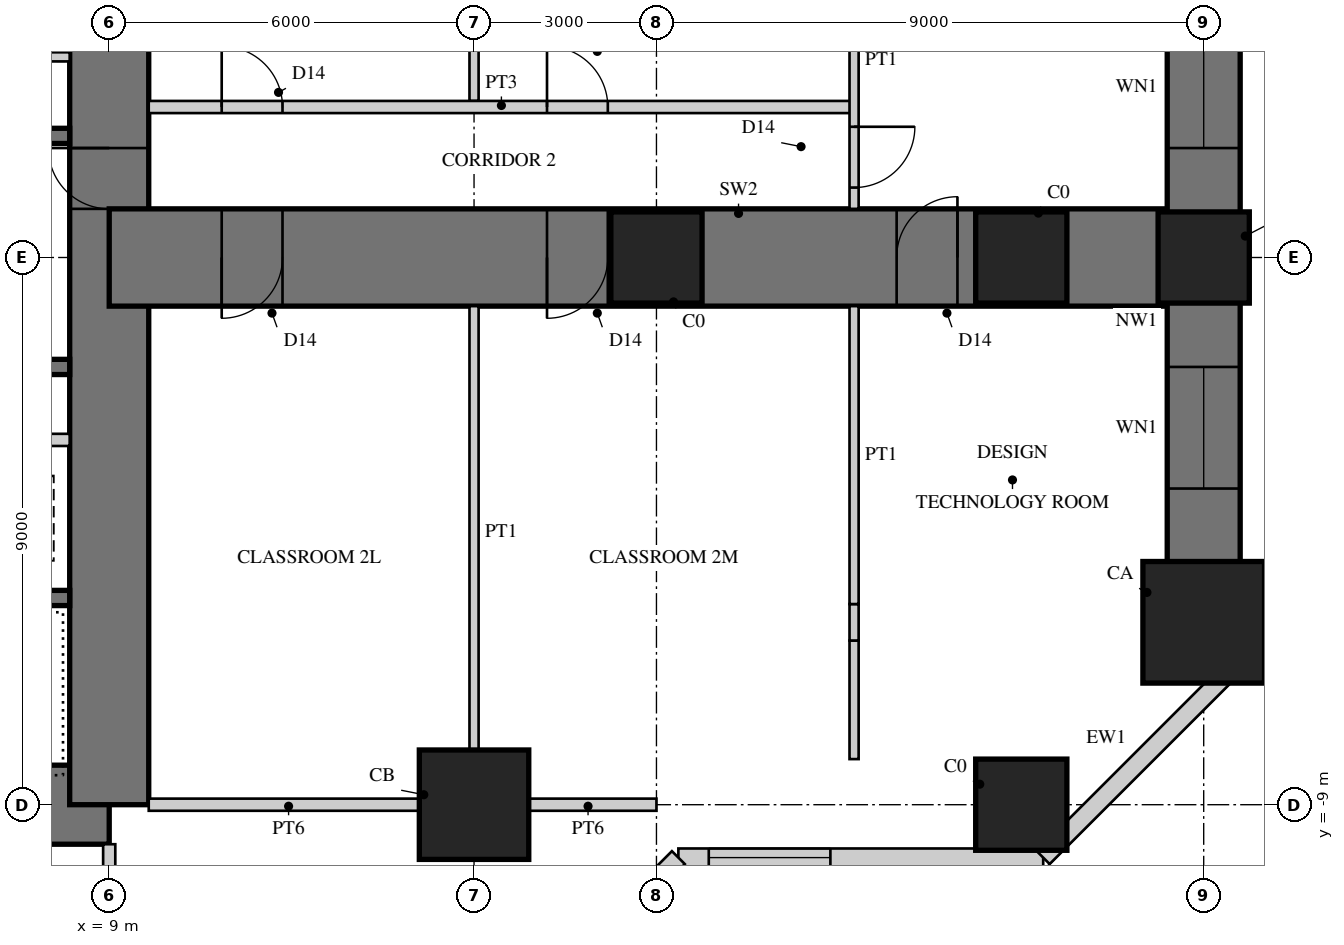
"""IFC4 building model, lengths in metres.
Left out: names, types, materials, properties, quantities, classifications, styles, units other than length and angle.
Written with IfcOpenShell. Run it as: python <this file> out.ifc"""

import sys

from ifc_helpers import new_model, si_unit, direction, frame, frame_2d, origin, origin_2d, place, context, subcontext, project, spatial, rectangle, hollow_rectangle, extrude, element, fill, save


model = new_model("IFC4")
c1 = context("Model", 3, precision=1e-05, world=origin(), true_north=direction((0.0, 1.0)))
c2 = subcontext(c1, "Body", "Model", "MODEL_VIEW")
j1 = project(units=[si_unit("LENGTHUNIT", "METRE"), si_unit("PLANEANGLEUNIT", "RADIAN")], contexts=[c1])
p1 = place(None, origin())
s1 = spatial("IfcSite", under=j1, at=p1, CompositionType="ELEMENT")
p2 = place(p1, origin())
s2 = spatial("IfcBuilding", under=s1, at=p2, CompositionType="ELEMENT")
p3 = place(p2, frame((0.0, 0.0, 9.5)))
s3 = spatial("IfcBuildingStorey", under=s2, at=p3, CompositionType="ELEMENT", Elevation=9.5)
p4 = place(p3, frame((-9.0, -9.0, 0.0), z_axis=(0.0, 0.0, 1.0), x_axis=(1.0, 0.0, 0.0)))
e1 = element("IfcWall", 1, at=p4, inside=s3, PredefinedType="SHEAR", context=c2, shape_type="SweptSolid", body=[
    extrude(rectangle(XDim=18.0, YDim=1.3, at=frame_2d((9.0, 0.0))), origin(), (0.0, 0.0, 1.0), 4.5),
])
p5 = place(p4, frame((9.8, 0.0, 0.0)))
e2 = element("IfcOpeningElement", 2, at=p5, cuts=e1, PredefinedType="OPENING", context=c2, shape_type="SweptSolid", body=[
    extrude(rectangle(XDim=1.0, YDim=2.4, at=frame_2d((0.5, 1.2))), frame((0.0, 0.66, 0.0), z_axis=(0.0, -1.0, 0.0), x_axis=(1.0, 0.0, 0.0)), (0.0, 0.0, 1.0), 1.32),
])
p6 = place(p3, frame((9.0, -9.0, 0.0), z_axis=(0.0, 0.0, 1.0), x_axis=(0.0, 1.0, 0.0)))
e3 = element("IfcWall", 3, at=p6, inside=s3, PredefinedType="SHEAR", context=c2, shape_type="SweptSolid", body=[
    extrude(rectangle(XDim=18.0, YDim=1.3, at=frame_2d((9.0, 0.0))), origin(), (0.0, 0.0, 1.0), 4.5),
])
p7 = place(p6, frame((9.8, 0.0, 0.0)))
e4 = element("IfcOpeningElement", 4, at=p7, cuts=e3, PredefinedType="OPENING", context=c2, shape_type="SweptSolid", body=[
    extrude(rectangle(XDim=1.0, YDim=2.4, at=frame_2d((0.5, 1.2))), frame((0.0, 0.66, 0.0), z_axis=(0.0, -1.0, 0.0), x_axis=(1.0, 0.0, 0.0)), (0.0, 0.0, 1.0), 1.32),
])
p8 = place(p3, frame((1.925, 2.0, 0.0), z_axis=(0.0, 0.0, 1.0), x_axis=(1.0, 0.0, 0.0)))
e5 = element("IfcWall", 5, at=p8, inside=s3, PredefinedType="SHEAR", context=c2, shape_type="SweptSolid", body=[
    extrude(rectangle(XDim=6.425, YDim=0.25, at=frame_2d((3.212, 0.0))), origin(), (0.0, 0.0, 1.0), 4.5),
])
p9 = place(p3, frame((1.925, 3.3, 0.0), z_axis=(0.0, 0.0, 1.0), x_axis=(1.0, 0.0, 0.0)))
e6 = element("IfcWall", 6, at=p9, inside=s3, PredefinedType="PARTITIONING", context=c2, shape_type="SweptSolid", body=[
    extrude(rectangle(XDim=6.425, YDim=0.15, at=frame_2d((3.212, 0.0))), origin(), (0.0, 0.0, 1.0), 4.5),
])
p10 = place(p9, frame((0.075, 0.0, 0.0)))
e7 = element("IfcOpeningElement", 7, at=p10, cuts=e6, PredefinedType="OPENING", context=c2, shape_type="SweptSolid", body=[
    extrude(rectangle(XDim=0.8, YDim=2.1, at=frame_2d((0.4, 1.05))), frame((0.0, 0.085, 0.0), z_axis=(0.0, -1.0, 0.0), x_axis=(1.0, 0.0, 0.0)), (0.0, 0.0, 1.0), 0.17),
])
p11 = place(p9, frame((3.675, 0.0, 0.0)))
e8 = element("IfcOpeningElement", 8, at=p11, cuts=e6, PredefinedType="OPENING", context=c2, shape_type="SweptSolid", body=[
    extrude(rectangle(XDim=0.8, YDim=2.1, at=frame_2d((0.4, 1.05))), frame((0.0, 0.085, 0.0), z_axis=(0.0, -1.0, 0.0), x_axis=(1.0, 0.0, 0.0)), (0.0, 0.0, 1.0), 0.17),
])
p12 = place(p3, frame((2.125, -1.8, 0.0), z_axis=(0.0, 0.0, 1.0), x_axis=(1.0, 0.0, 0.0)))
e9 = element("IfcWall", 9, at=p12, inside=s3, PredefinedType="SHEAR", context=c2, shape_type="SweptSolid", body=[
    extrude(rectangle(XDim=6.225, YDim=0.25, at=frame_2d((3.113, 0.0))), origin(), (0.0, 0.0, 1.0), 4.5),
])
p13 = place(p3, frame((2.125, -5.6, 0.0), z_axis=(0.0, 0.0, 1.0), x_axis=(1.0, 0.0, 0.0)))
e10 = element("IfcWall", 10, at=p13, inside=s3, PredefinedType="SHEAR", context=c2, shape_type="SweptSolid", body=[
    extrude(rectangle(XDim=6.225, YDim=0.25, at=frame_2d((3.113, 0.0))), origin(), (0.0, 0.0, 1.0), 4.5),
])
p14 = place(p13, frame((0.175, 0.0, 0.0)))
e11 = element("IfcOpeningElement", 11, at=p14, cuts=e10, PredefinedType="OPENING", context=c2, shape_type="SweptSolid", body=[
    extrude(rectangle(XDim=1.0, YDim=2.1, at=frame_2d((0.5, 1.05))), frame((0.0, 0.135, 0.0), z_axis=(0.0, -1.0, 0.0), x_axis=(1.0, 0.0, 0.0)), (0.0, 0.0, 1.0), 0.27),
])
p15 = place(p3, frame((5.725, -3.0, 0.0), z_axis=(0.0, 0.0, 1.0), x_axis=(1.0, 0.0, 0.0)))
e12 = element("IfcWall", 12, at=p15, inside=s3, PredefinedType="PARTITIONING", context=c2, shape_type="SweptSolid", body=[
    extrude(rectangle(XDim=2.625, YDim=0.2, at=frame_2d((1.312, 0.0))), origin(), (0.0, 0.0, 1.0), 4.5),
])
p16 = place(p3, frame((9.0, 0.0, 0.0), z_axis=(0.0, 0.0, 1.0), x_axis=(1.0, 0.0, 0.0)))
e13 = element("IfcWall", 13, at=p16, inside=s3, PredefinedType="SHEAR", context=c2, shape_type="SweptSolid", body=[
    extrude(rectangle(XDim=18.0, YDim=1.6, at=frame_2d((9.0, 0.0))), origin(), (0.0, 0.0, 1.0), 4.5),
])
p17 = place(p16, frame((1.85, 0.0, 0.0)))
e14 = element("IfcOpeningElement", 14, at=p17, cuts=e13, PredefinedType="OPENING", context=c2, shape_type="SweptSolid", body=[
    extrude(rectangle(XDim=1.0, YDim=2.2, at=frame_2d((0.5, 1.1))), frame((0.0, 0.81, 0.0), z_axis=(0.0, -1.0, 0.0), x_axis=(1.0, 0.0, 0.0)), (0.0, 0.0, 1.0), 1.62),
])
p18 = place(p16, frame((7.2, 0.0, 0.0)))
e15 = element("IfcOpeningElement", 15, at=p18, cuts=e13, PredefinedType="OPENING", context=c2, shape_type="SweptSolid", body=[
    extrude(rectangle(XDim=1.0, YDim=2.2, at=frame_2d((0.5, 1.1))), frame((0.0, 0.81, 0.0), z_axis=(0.0, -1.0, 0.0), x_axis=(1.0, 0.0, 0.0)), (0.0, 0.0, 1.0), 1.62),
])
p19 = place(p16, frame((12.95, 0.0, 0.0)))
e16 = element("IfcOpeningElement", 16, at=p19, cuts=e13, PredefinedType="OPENING", context=c2, shape_type="SweptSolid", body=[
    extrude(rectangle(XDim=1.0, YDim=2.2, at=frame_2d((0.5, 1.1))), frame((0.0, 0.81, 0.0), z_axis=(0.0, -1.0, 0.0), x_axis=(1.0, 0.0, 0.0)), (0.0, 0.0, 1.0), 1.62),
])
p20 = place(p3, frame((27.0, -6.0, 0.0), z_axis=(0.0, 0.0, 1.0), x_axis=(0.0, 1.0, 0.0)))
e17 = element("IfcWall", 17, at=p20, inside=s3, PredefinedType="SHEAR", context=c2, shape_type="SweptSolid", body=[
    extrude(rectangle(XDim=12.0, YDim=1.2, at=frame_2d((6.0, 0.0))), origin(), (0.0, 0.0, 1.0), 4.5),
])
p21 = place(p20, frame((2.2, 0.0, 0.9)))
e18 = element("IfcOpeningElement", 18, at=p21, cuts=e17, PredefinedType="OPENING", context=c2, shape_type="SweptSolid", body=[
    extrude(rectangle(XDim=2.0, YDim=1.8, at=frame_2d((1.0, 0.9))), frame((0.0, 0.61, 0.0), z_axis=(0.0, -1.0, 0.0), x_axis=(1.0, 0.0, 0.0)), (0.0, 0.0, 1.0), 1.22),
])
p22 = place(p20, frame((7.8, 0.0, 0.9)))
e19 = element("IfcOpeningElement", 19, at=p22, cuts=e17, PredefinedType="OPENING", context=c2, shape_type="SweptSolid", body=[
    extrude(rectangle(XDim=2.0, YDim=1.8, at=frame_2d((1.0, 0.9))), frame((0.0, 0.61, 0.0), z_axis=(0.0, -1.0, 0.0), x_axis=(1.0, 0.0, 0.0)), (0.0, 0.0, 1.0), 1.22),
])
p23 = place(p3, frame((15.0, -9.0, 0.0), z_axis=(0.0, 0.0, 1.0), x_axis=(1.0, 0.0, 0.0)))
e20 = element("IfcColumn", 20, at=p23, inside=s3, PredefinedType="COLUMN", context=c2, shape_type="SweptSolid", body=[
    extrude(rectangle(XDim=1.8, YDim=1.8, at=origin_2d()), origin(), (0.0, 0.0, 1.0), 4.5),
])
p24 = place(p3, frame((24.0, -9.0, 0.0), z_axis=(0.0, 0.0, 1.0), x_axis=(1.0, 0.0, 0.0)))
e21 = element("IfcColumn", 21, at=p24, inside=s3, PredefinedType="COLUMN", context=c2, shape_type="SweptSolid", body=[
    extrude(rectangle(XDim=1.5, YDim=1.5, at=origin_2d()), origin(), (0.0, 0.0, 1.0), 4.5),
])
p25 = place(p3, frame((27.0, -6.0, 0.0), z_axis=(0.0, 0.0, 1.0), x_axis=(1.0, 0.0, 0.0)))
e22 = element("IfcColumn", 22, at=p25, inside=s3, PredefinedType="COLUMN", context=c2, shape_type="SweptSolid", body=[
    extrude(rectangle(XDim=2.0, YDim=2.0, at=origin_2d()), origin(), (0.0, 0.0, 1.0), 4.5),
])
for number, where, z_axis, x_axis in (
    (23, (27.0, 0.0, 0.0), (0.0, 0.0, 1.0), (1.0, 0.0, 0.0)),
    (24, (18.0, 0.0, 0.0), (0.0, 0.0, 1.0), (1.0, 0.0, 0.0)),
    (25, (24.0, 0.0, 0.0), (0.0, 0.0, 1.0), (1.0, 0.0, 0.0)),
):
    element("IfcColumn", number, at=place(p3, frame(where, z_axis=z_axis, x_axis=x_axis)), inside=s3, PredefinedType="COLUMN", context=c2, shape_type="SweptSolid", body=[
        extrude(rectangle(XDim=1.5, YDim=1.5, at=origin_2d()), origin(), (0.0, 0.0, 1.0), 4.5),
    ])
p26 = place(p3, frame((18.36, -9.87, 0.0), z_axis=(0.0, 0.0, 1.0), x_axis=(1.0, 0.0, 0.0)))
e26 = element("IfcWall", 26, at=p26, inside=s3, PredefinedType="SOLIDWALL", context=c2, shape_type="SweptSolid", body=[
    extrude(rectangle(XDim=6.0, YDim=0.3, at=frame_2d((3.0, 0.0))), origin(), (0.0, 0.0, 1.0), 4.3),
])
p27 = place(p26, frame((0.5, 0.0, 0.9)))
e27 = element("IfcOpeningElement", 27, at=p27, cuts=e26, PredefinedType="OPENING", context=c2, shape_type="SweptSolid", body=[
    extrude(rectangle(XDim=2.0, YDim=1.8, at=frame_2d((1.0, 0.9))), frame((0.0, 0.16, 0.0), z_axis=(0.0, -1.0, 0.0), x_axis=(1.0, 0.0, 0.0)), (0.0, 0.0, 1.0), 0.32),
])
p28 = place(p3, frame((24.36, -9.87, 0.0), z_axis=(0.0, 0.0, 1.0), x_axis=(0.707106781187, 0.707106781187, 0.0)))
e28 = element("IfcWall", 28, at=p28, inside=s3, PredefinedType="SOLIDWALL", context=c2, shape_type="SweptSolid", body=[
    extrude(rectangle(XDim=4.582, YDim=0.3, at=frame_2d((2.291, 0.0))), origin(), (0.0, 0.0, 1.0), 4.3),
])
p29 = place(p3, frame((9.87, -18.36, 0.0), z_axis=(0.0, 0.0, 1.0), x_axis=(0.707106781187, 0.707106781187, 0.0)))
e29 = element("IfcWall", 29, at=p29, inside=s3, PredefinedType="SOLIDWALL", context=c2, shape_type="SweptSolid", body=[
    extrude(rectangle(XDim=12.007, YDim=0.3, at=frame_2d((6.003, 0.0))), origin(), (0.0, 0.0, 1.0), 4.3),
])
p30 = place(p29, frame((0.501, 0.0, 0.9)))
e30 = element("IfcOpeningElement", 30, at=p30, cuts=e29, PredefinedType="OPENING", context=c2, shape_type="SweptSolid", body=[
    extrude(rectangle(XDim=2.0, YDim=1.8, at=frame_2d((1.0, 0.9))), frame((0.0, 0.16, 0.0), z_axis=(0.0, -1.0, 0.0), x_axis=(1.0, 0.0, 0.0)), (0.0, 0.0, 1.0), 0.32),
])
p31 = place(p29, frame((9.506, 0.0, 0.9)))
e31 = element("IfcOpeningElement", 31, at=p31, cuts=e29, PredefinedType="OPENING", context=c2, shape_type="SweptSolid", body=[
    extrude(rectangle(XDim=2.0, YDim=1.8, at=frame_2d((1.0, 0.9))), frame((0.0, 0.16, 0.0), z_axis=(0.0, -1.0, 0.0), x_axis=(1.0, 0.0, 0.0)), (0.0, 0.0, 1.0), 0.32),
])
p32 = place(p3, frame((15.0, 2.575, 0.0), z_axis=(0.0, 0.0, 1.0), x_axis=(0.0, 1.0, 0.0)))
e32 = element("IfcWall", 32, at=p32, inside=s3, PredefinedType="PARTITIONING", context=c2, shape_type="SweptSolid", body=[
    extrude(rectangle(XDim=5.675, YDim=0.15, at=frame_2d((2.837, 0.0))), origin(), (0.0, 0.0, 1.0), 3.35),
])
p33 = place(p3, frame((15.0, -8.25, 0.0), z_axis=(0.0, 0.0, 1.0), x_axis=(0.0, 1.0, 0.0)))
e33 = element("IfcWall", 33, at=p33, inside=s3, PredefinedType="PARTITIONING", context=c2, shape_type="SweptSolid", body=[
    extrude(rectangle(XDim=7.45, YDim=0.15, at=frame_2d((3.725, 0.0))), origin(), (0.0, 0.0, 1.0), 3.35),
])
p34 = place(p3, frame((9.65, 2.475, 0.0), z_axis=(0.0, 0.0, 1.0), x_axis=(1.0, 0.0, 0.0)))
e34 = element("IfcWall", 34, at=p34, inside=s3, PredefinedType="SOLIDWALL", context=c2, shape_type="SweptSolid", body=[
    extrude(rectangle(XDim=11.6, YDim=0.2, at=frame_2d((5.8, 0.0))), origin(), (0.0, 0.0, 1.0), 4.3),
])
p35 = place(p34, frame((1.2, 0.0, 0.0)))
e35 = element("IfcOpeningElement", 35, at=p35, cuts=e34, PredefinedType="OPENING", context=c2, shape_type="SweptSolid", body=[
    extrude(rectangle(XDim=1.0, YDim=2.2, at=frame_2d((0.5, 1.1))), frame((0.0, 0.11, 0.0), z_axis=(0.0, -1.0, 0.0), x_axis=(1.0, 0.0, 0.0)), (0.0, 0.0, 1.0), 0.22),
])
p36 = place(p34, frame((6.55, 0.0, 0.0)))
e36 = element("IfcOpeningElement", 36, at=p36, cuts=e34, PredefinedType="OPENING", context=c2, shape_type="SweptSolid", body=[
    extrude(rectangle(XDim=1.0, YDim=2.2, at=frame_2d((0.5, 1.1))), frame((0.0, 0.11, 0.0), z_axis=(0.0, -1.0, 0.0), x_axis=(1.0, 0.0, 0.0)), (0.0, 0.0, 1.0), 0.22),
])
p37 = place(p3, frame((21.25, -8.25, 0.0), z_axis=(0.0, 0.0, 1.0), x_axis=(0.0, 1.0, 0.0)))
e37 = element("IfcWall", 37, at=p37, inside=s3, PredefinedType="PARTITIONING", context=c2, shape_type="SweptSolid", body=[
    extrude(rectangle(XDim=1.95, YDim=0.15, at=frame_2d((0.975, 0.0))), origin(), (0.0, 0.0, 1.0), 3.35),
])
p38 = place(p3, frame((21.25, -6.3, 0.0), z_axis=(0.0, 0.0, 1.0), x_axis=(0.0, 1.0, 0.0)))
e38 = element("IfcWall", 38, at=p38, inside=s3, PredefinedType="PARTITIONING", context=c2, shape_type="SweptSolid", body=[
    extrude(rectangle(XDim=0.6, YDim=0.15, at=frame_2d((0.3, 0.0))), origin(), (0.0, 0.0, 1.0), 4.3),
])
p39 = place(p3, frame((21.25, -5.7, 0.0), z_axis=(0.0, 0.0, 1.0), x_axis=(0.0, 1.0, 0.0)))
e39 = element("IfcWall", 39, at=p39, inside=s3, PredefinedType="PARTITIONING", context=c2, shape_type="SweptSolid", body=[
    extrude(rectangle(XDim=4.9, YDim=0.15, at=frame_2d((2.45, 0.0))), origin(), (0.0, 0.0, 1.0), 3.35),
])
p40 = place(p3, frame((21.25, 0.8, 0.0), z_axis=(0.0, 0.0, 1.0), x_axis=(0.0, 1.0, 0.0)))
e40 = element("IfcWall", 40, at=p40, inside=s3, PredefinedType="PARTITIONING", context=c2, shape_type="SweptSolid", body=[
    extrude(rectangle(XDim=4.9, YDim=0.15, at=frame_2d((2.45, 0.0))), origin(), (0.0, 0.0, 1.0), 3.35),
])
p41 = place(p40, frame((0.35, 0.0, 0.0)))
e41 = element("IfcOpeningElement", 41, at=p41, cuts=e40, PredefinedType="OPENING", context=c2, shape_type="SweptSolid", body=[
    extrude(rectangle(XDim=1.0, YDim=2.2, at=frame_2d((0.5, 1.1))), frame((0.0, 0.085, 0.0), z_axis=(0.0, -1.0, 0.0), x_axis=(1.0, 0.0, 0.0)), (0.0, 0.0, 1.0), 0.17),
])
p42 = place(p3, frame((9.0, -9.65, 0.0), z_axis=(0.0, 0.0, 1.0), x_axis=(0.0, -1.0, 0.0)))
e42 = element("IfcWall", 42, at=p42, inside=s3, PredefinedType="SOLIDWALL", context=c2, shape_type="SweptSolid", body=[
    extrude(rectangle(XDim=4.6, YDim=0.2, at=frame_2d((2.3, 0.0))), origin(), (0.0, 0.0, 1.0), 3.3),
])
p43 = place(p42, frame((1.2, 0.0, 0.0)))
e43 = element("IfcOpeningElement", 43, at=p43, cuts=e42, PredefinedType="OPENING", context=c2, shape_type="SweptSolid", body=[
    extrude(rectangle(XDim=1.0, YDim=2.2, at=frame_2d((0.5, 1.1))), frame((0.0, 0.11, 0.0), z_axis=(0.0, -1.0, 0.0), x_axis=(1.0, 0.0, 0.0)), (0.0, 0.0, 1.0), 0.22),
])
p44 = place(p3, frame((14.25, -9.0, 0.0), z_axis=(0.0, 0.0, 1.0), x_axis=(-1.0, 0.0, 0.0)))
e44 = element("IfcWall", 44, at=p44, inside=s3, PredefinedType="SOLIDWALL", context=c2, shape_type="SweptSolid", body=[
    extrude(rectangle(XDim=4.6, YDim=0.2, at=frame_2d((2.3, 0.0))), origin(), (0.0, 0.0, 1.0), 3.3),
])
p45 = place(p3, frame((18.0, -9.0, 0.0), z_axis=(0.0, 0.0, 1.0), x_axis=(-1.0, 0.0, 0.0)))
e45 = element("IfcWall", 45, at=p45, inside=s3, PredefinedType="SOLIDWALL", context=c2, shape_type="SweptSolid", body=[
    extrude(rectangle(XDim=2.25, YDim=0.2, at=frame_2d((1.125, 0.0))), origin(), (0.0, 0.0, 1.0), 3.3),
])
p46 = place(p27, origin())
e46 = element("IfcWindow", 46, at=p46, inside=s3, PartitioningType="SINGLE_PANEL", PredefinedType="WINDOW", context=c2, shape_type="SweptSolid", body=[
    extrude(hollow_rectangle(XDim=2.0, YDim=1.8, WallThickness=0.06, at=frame_2d((1.0, 0.9))), frame((0.0, 0.03, 0.0), z_axis=(0.0, -1.0, 0.0), x_axis=(1.0, 0.0, 0.0)), (0.0, 0.0, 1.0), 0.06),
    extrude(rectangle(XDim=1.879, YDim=1.679, at=frame_2d((1.0, 0.9))), frame((0.0, 0.03, 0.0), z_axis=(0.0, -1.0, 0.0), x_axis=(1.0, 0.0, 0.0)), (0.0, 0.0, 1.0), 0.06),
])
fill(e27, e46)
p47 = place(p21, origin())
e47 = element("IfcWindow", 47, at=p47, inside=s3, PartitioningType="SINGLE_PANEL", PredefinedType="WINDOW", context=c2, shape_type="SweptSolid", body=[
    extrude(hollow_rectangle(XDim=2.0, YDim=1.8, WallThickness=0.06, at=frame_2d((1.0, 0.9))), frame((0.0, 0.03, 0.0), z_axis=(0.0, -1.0, 0.0), x_axis=(1.0, 0.0, 0.0)), (0.0, 0.0, 1.0), 0.06),
    extrude(rectangle(XDim=1.879, YDim=1.679, at=frame_2d((1.0, 0.9))), frame((0.0, 0.03, 0.0), z_axis=(0.0, -1.0, 0.0), x_axis=(1.0, 0.0, 0.0)), (0.0, 0.0, 1.0), 0.06),
])
fill(e18, e47)
p48 = place(p22, origin())
e48 = element("IfcWindow", 48, at=p48, inside=s3, PartitioningType="SINGLE_PANEL", PredefinedType="WINDOW", context=c2, shape_type="SweptSolid", body=[
    extrude(hollow_rectangle(XDim=2.0, YDim=1.8, WallThickness=0.06, at=frame_2d((1.0, 0.9))), frame((0.0, 0.03, 0.0), z_axis=(0.0, -1.0, 0.0), x_axis=(1.0, 0.0, 0.0)), (0.0, 0.0, 1.0), 0.06),
    extrude(rectangle(XDim=1.879, YDim=1.679, at=frame_2d((1.0, 0.9))), frame((0.0, 0.03, 0.0), z_axis=(0.0, -1.0, 0.0), x_axis=(1.0, 0.0, 0.0)), (0.0, 0.0, 1.0), 0.06),
])
fill(e19, e48)
p49 = place(p35, origin())
e49 = element("IfcDoor", 49, at=p49, inside=s3, OperationType="SINGLE_SWING_LEFT", PredefinedType="DOOR", context=c2, shape_type="SweptSolid", body=[
    extrude(rectangle(XDim=1.0, YDim=2.2, at=frame_2d((0.5, 1.1))), frame((0.0, 0.025, 0.0), z_axis=(0.0, -1.0, 0.0), x_axis=(1.0, 0.0, 0.0)), (0.0, 0.0, 1.0), 0.05),
])
fill(e35, e49)
p50 = place(p36, origin())
e50 = element("IfcDoor", 50, at=p50, inside=s3, OperationType="SINGLE_SWING_LEFT", PredefinedType="DOOR", context=c2, shape_type="SweptSolid", body=[
    extrude(rectangle(XDim=1.0, YDim=2.2, at=frame_2d((0.5, 1.1))), frame((0.0, 0.025, 0.0), z_axis=(0.0, -1.0, 0.0), x_axis=(1.0, 0.0, 0.0)), (0.0, 0.0, 1.0), 0.05),
])
fill(e36, e50)
p51 = place(p41, frame((1.0, 0.0, 0.0), z_axis=(0.0, 0.0, 1.0), x_axis=(-1.0, 0.0, 0.0)))
e51 = element("IfcDoor", 51, at=p51, inside=s3, OperationType="SINGLE_SWING_LEFT", PredefinedType="DOOR", context=c2, shape_type="SweptSolid", body=[
    extrude(rectangle(XDim=1.0, YDim=2.2, at=frame_2d((0.5, 1.1))), frame((0.0, 0.025, 0.0), z_axis=(0.0, -1.0, 0.0), x_axis=(1.0, 0.0, 0.0)), (0.0, 0.0, 1.0), 0.05),
])
fill(e41, e51)
p52 = place(p17, frame((1.0, 0.0, 0.0), z_axis=(0.0, 0.0, 1.0), x_axis=(-1.0, 0.0, 0.0)))
e52 = element("IfcDoor", 52, at=p52, inside=s3, OperationType="SINGLE_SWING_RIGHT", PredefinedType="DOOR", context=c2, shape_type="SweptSolid", body=[
    extrude(rectangle(XDim=1.0, YDim=2.2, at=frame_2d((0.5, 1.1))), frame((0.0, 0.025, 0.0), z_axis=(0.0, -1.0, 0.0), x_axis=(1.0, 0.0, 0.0)), (0.0, 0.0, 1.0), 0.05),
])
fill(e14, e52)
p53 = place(p18, frame((1.0, 0.0, 0.0), z_axis=(0.0, 0.0, 1.0), x_axis=(-1.0, 0.0, 0.0)))
e53 = element("IfcDoor", 53, at=p53, inside=s3, OperationType="SINGLE_SWING_RIGHT", PredefinedType="DOOR", context=c2, shape_type="SweptSolid", body=[
    extrude(rectangle(XDim=1.0, YDim=2.2, at=frame_2d((0.5, 1.1))), frame((0.0, 0.025, 0.0), z_axis=(0.0, -1.0, 0.0), x_axis=(1.0, 0.0, 0.0)), (0.0, 0.0, 1.0), 0.05),
])
fill(e15, e53)
p54 = place(p19, origin())
e54 = element("IfcDoor", 54, at=p54, inside=s3, OperationType="SINGLE_SWING_RIGHT", PredefinedType="DOOR", context=c2, shape_type="SweptSolid", body=[
    extrude(rectangle(XDim=1.0, YDim=2.2, at=frame_2d((0.5, 1.1))), frame((0.0, 0.025, 0.0), z_axis=(0.0, -1.0, 0.0), x_axis=(1.0, 0.0, 0.0)), (0.0, 0.0, 1.0), 0.05),
])
fill(e16, e54)
p55 = place(p7, origin())
e55 = element("IfcDoor", 55, at=p55, inside=s3, OperationType="SINGLE_SWING_RIGHT", PredefinedType="DOOR", context=c2, shape_type="SweptSolid", body=[
    extrude(rectangle(XDim=1.0, YDim=2.4, at=frame_2d((0.5, 1.2))), frame((0.0, 0.055, 0.0), z_axis=(0.0, -1.0, 0.0), x_axis=(1.0, 0.0, 0.0)), (0.0, 0.0, 1.0), 0.05),
])
fill(e4, e55)
save(model, sys.argv[1])
